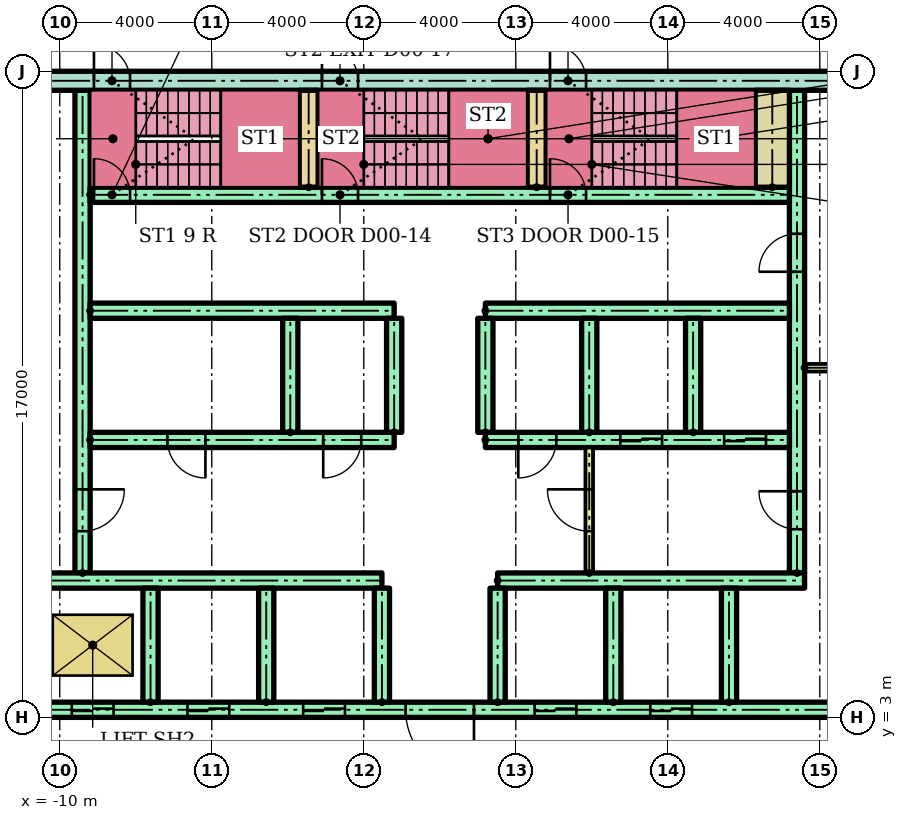
"""IFC4 building model, lengths in metres.
Left out: names, types, materials, properties, quantities, classifications, styles, units other than length and angle.
Written with IfcOpenShell. Run it as: python <this file> out.ifc"""

import sys

from ifc_helpers import new_model, si_unit, direction, frame, frame_2d, origin, place, context, subcontext, project, spatial, rectangle, extrude, element, fill, save


model = new_model("IFC4")
c1 = context("Model", 3, precision=1e-05, world=origin(), true_north=direction((0.0, 1.0)))
c2 = subcontext(c1, "Body", "Model", "MODEL_VIEW")
j1 = project(units=[si_unit("LENGTHUNIT", "METRE"), si_unit("PLANEANGLEUNIT", "RADIAN")], contexts=[c1])
p1 = place(None, origin())
s1 = spatial("IfcSite", under=j1, at=p1, CompositionType="ELEMENT")
p2 = place(p1, origin())
s2 = spatial("IfcBuilding", under=s1, at=p2, CompositionType="ELEMENT")
p3 = place(p2, origin())
s3 = spatial("IfcBuildingStorey", under=s2, at=p3, CompositionType="ELEMENT", Elevation=0.0)
p4 = place(p3, frame((-13.5, 19.75, 0.0)))
e1 = element("IfcWall", 1, at=p4, inside=s3, PredefinedType="SHEAR", context=c2, shape_type="SweptSolid", body=[
    extrude(rectangle(XDim=27.0, YDim=0.5, at=frame_2d((13.5, 0.0))), origin(), (0.0, 0.0, 1.0), 5.7),
])
p5 = place(p4, frame((4.4, 0.0, 0.0)))
e2 = element("IfcOpeningElement", 2, at=p5, cuts=e1, PredefinedType="OPENING", context=c2, shape_type="SweptSolid", body=[
    extrude(rectangle(XDim=0.95, YDim=2.1, at=frame_2d((0.475, 1.05))), frame((0.0, 0.26, 0.0), z_axis=(0.0, -1.0, 0.0), x_axis=(1.0, 0.0, 0.0)), (0.0, 0.0, 1.0), 0.52),
])
p6 = place(p4, frame((10.4, 0.0, 0.0)))
e3 = element("IfcOpeningElement", 3, at=p6, cuts=e1, PredefinedType="OPENING", context=c2, shape_type="SweptSolid", body=[
    extrude(rectangle(XDim=0.95, YDim=2.1, at=frame_2d((0.475, 1.05))), frame((0.0, 0.26, 0.0), z_axis=(0.0, -1.0, 0.0), x_axis=(1.0, 0.0, 0.0)), (0.0, 0.0, 1.0), 0.52),
])
p7 = place(p4, frame((16.4, 0.0, 0.0)))
e4 = element("IfcOpeningElement", 4, at=p7, cuts=e1, PredefinedType="OPENING", context=c2, shape_type="SweptSolid", body=[
    extrude(rectangle(XDim=0.95, YDim=2.1, at=frame_2d((0.475, 1.05))), frame((0.0, 0.26, 0.0), z_axis=(0.0, -1.0, 0.0), x_axis=(1.0, 0.0, 0.0)), (0.0, 0.0, 1.0), 0.52),
])
p8 = place(p3, frame((-9.4, 6.8, 0.0), z_axis=(0.0, 0.0, 1.0), x_axis=(0.0, 1.0, 0.0)))
e5 = element("IfcWall", 5, at=p8, inside=s3, PredefinedType="SHEAR", context=c2, shape_type="SweptSolid", body=[
    extrude(rectangle(XDim=12.7, YDim=0.4, at=frame_2d((6.35, 0.0))), origin(), (0.0, 0.0, 1.0), 5.7),
])
p9 = place(p8, frame((1.1, 0.0, 0.0)))
e6 = element("IfcOpeningElement", 6, at=p9, cuts=e5, PredefinedType="OPENING", context=c2, shape_type="SweptSolid", body=[
    extrude(rectangle(XDim=1.1, YDim=2.1, at=frame_2d((0.55, 1.05))), frame((0.0, 0.21, 0.0), z_axis=(0.0, -1.0, 0.0), x_axis=(1.0, 0.0, 0.0)), (0.0, 0.0, 1.0), 0.42),
])
p10 = place(p3, frame((9.4, 6.8, 0.0), z_axis=(0.0, 0.0, 1.0), x_axis=(0.0, 1.0, 0.0)))
e7 = element("IfcWall", 7, at=p10, inside=s3, PredefinedType="SHEAR", context=c2, shape_type="SweptSolid", body=[
    extrude(rectangle(XDim=12.7, YDim=0.4, at=frame_2d((6.35, 0.0))), origin(), (0.0, 0.0, 1.0), 5.7),
])
p11 = place(p10, frame((1.15, 0.0, 0.0)))
e8 = element("IfcOpeningElement", 8, at=p11, cuts=e7, PredefinedType="OPENING", context=c2, shape_type="SweptSolid", body=[
    extrude(rectangle(XDim=1.0, YDim=2.1, at=frame_2d((0.5, 1.05))), frame((0.0, 0.21, 0.0), z_axis=(0.0, -1.0, 0.0), x_axis=(1.0, 0.0, 0.0)), (0.0, 0.0, 1.0), 0.42),
])
p12 = place(p10, frame((7.925, 0.0, 0.0)))
e9 = element("IfcOpeningElement", 9, at=p12, cuts=e7, PredefinedType="OPENING", context=c2, shape_type="SweptSolid", body=[
    extrude(rectangle(XDim=1.0, YDim=2.1, at=frame_2d((0.5, 1.05))), frame((0.0, 0.21, 0.0), z_axis=(0.0, -1.0, 0.0), x_axis=(1.0, 0.0, 0.0)), (0.0, 0.0, 1.0), 0.42),
])
p13 = place(p3, frame((-13.5, 3.2, 0.0)))
e10 = element("IfcWall", 10, at=p13, inside=s3, PredefinedType="SHEAR", context=c2, shape_type="SweptSolid", body=[
    extrude(rectangle(XDim=27.0, YDim=0.4, at=frame_2d((13.5, 0.0))), origin(), (0.0, 0.0, 1.0), 5.7),
])
p14 = place(p13, frame((0.772, 0.0, 0.0)))
e11 = element("IfcOpeningElement", 11, at=p14, cuts=e10, PredefinedType="OPENING", context=c2, shape_type="SweptSolid", body=[
    extrude(rectangle(XDim=1.1, YDim=2.1, at=frame_2d((0.55, 1.05))), frame((0.0, 0.21, 0.0), z_axis=(0.0, -1.0, 0.0), x_axis=(1.0, 0.0, 0.0)), (0.0, 0.0, 1.0), 0.42),
])
p15 = place(p13, frame((3.817, 0.0, 0.0)))
e12 = element("IfcOpeningElement", 12, at=p15, cuts=e10, PredefinedType="OPENING", context=c2, shape_type="SweptSolid", body=[
    extrude(rectangle(XDim=1.1, YDim=2.1, at=frame_2d((0.55, 1.05))), frame((0.0, 0.21, 0.0), z_axis=(0.0, -1.0, 0.0), x_axis=(1.0, 0.0, 0.0)), (0.0, 0.0, 1.0), 0.42),
])
p16 = place(p13, frame((6.861, 0.0, 0.0)))
e13 = element("IfcOpeningElement", 13, at=p16, cuts=e10, PredefinedType="OPENING", context=c2, shape_type="SweptSolid", body=[
    extrude(rectangle(XDim=1.1, YDim=2.1, at=frame_2d((0.55, 1.05))), frame((0.0, 0.21, 0.0), z_axis=(0.0, -1.0, 0.0), x_axis=(1.0, 0.0, 0.0)), (0.0, 0.0, 1.0), 0.42),
])
p17 = place(p13, frame((9.906, 0.0, 0.0)))
e14 = element("IfcOpeningElement", 14, at=p17, cuts=e10, PredefinedType="OPENING", context=c2, shape_type="SweptSolid", body=[
    extrude(rectangle(XDim=1.1, YDim=2.1, at=frame_2d((0.55, 1.05))), frame((0.0, 0.21, 0.0), z_axis=(0.0, -1.0, 0.0), x_axis=(1.0, 0.0, 0.0)), (0.0, 0.0, 1.0), 0.42),
])
p18 = place(p13, frame((15.994, 0.0, 0.0)))
e15 = element("IfcOpeningElement", 15, at=p18, cuts=e10, PredefinedType="OPENING", context=c2, shape_type="SweptSolid", body=[
    extrude(rectangle(XDim=1.1, YDim=2.1, at=frame_2d((0.55, 1.05))), frame((0.0, 0.21, 0.0), z_axis=(0.0, -1.0, 0.0), x_axis=(1.0, 0.0, 0.0)), (0.0, 0.0, 1.0), 0.42),
])
p19 = place(p13, frame((19.039, 0.0, 0.0)))
e16 = element("IfcOpeningElement", 16, at=p19, cuts=e10, PredefinedType="OPENING", context=c2, shape_type="SweptSolid", body=[
    extrude(rectangle(XDim=1.1, YDim=2.1, at=frame_2d((0.55, 1.05))), frame((0.0, 0.21, 0.0), z_axis=(0.0, -1.0, 0.0), x_axis=(1.0, 0.0, 0.0)), (0.0, 0.0, 1.0), 0.42),
])
p20 = place(p13, frame((12.6, 0.0, 0.0)))
e17 = element("IfcOpeningElement", 17, at=p20, cuts=e10, PredefinedType="OPENING", context=c2, shape_type="SweptSolid", body=[
    extrude(rectangle(XDim=1.8, YDim=2.1, at=frame_2d((0.9, 1.05))), frame((0.0, 0.21, 0.0), z_axis=(0.0, -1.0, 0.0), x_axis=(1.0, 0.0, 0.0)), (0.0, 0.0, 1.0), 0.42),
])
p21 = place(p3, frame((-13.5, 6.6, 0.0)))
e18 = element("IfcWall", 18, at=p21, inside=s3, PredefinedType="SHEAR", context=c2, shape_type="SweptSolid", body=[
    extrude(rectangle(XDim=11.978, YDim=0.4, at=frame_2d((5.989, 0.0))), origin(), (0.0, 0.0, 1.0), 5.7),
])
p22 = place(p3, frame((1.522, 6.6, 0.0)))
e19 = element("IfcWall", 19, at=p22, inside=s3, PredefinedType="SHEAR", context=c2, shape_type="SweptSolid", body=[
    extrude(rectangle(XDim=8.078, YDim=0.4, at=frame_2d((4.039, 0.0))), origin(), (0.0, 0.0, 1.0), 5.7),
])
for number, where, z_axis, x_axis in (
    (20, (-7.611, 3.4, 0.0), (0.0, 0.0, 1.0), (0.0, 1.0, 0.0)),
    (21, (-4.567, 3.4, 0.0), (0.0, 0.0, 1.0), (0.0, 1.0, 0.0)),
    (22, (-1.522, 3.4, 0.0), (0.0, 0.0, 1.0), (0.0, 1.0, 0.0)),
    (23, (1.522, 3.4, 0.0), (0.0, 0.0, 1.0), (0.0, 1.0, 0.0)),
    (24, (4.567, 3.4, 0.0), (0.0, 0.0, 1.0), (0.0, 1.0, 0.0)),
    (25, (7.611, 3.4, 0.0), (0.0, 0.0, 1.0), (0.0, 1.0, 0.0)),
):
    element("IfcWall", number, at=place(p3, frame(where, z_axis=z_axis, x_axis=x_axis)), inside=s3, PredefinedType="SHEAR", context=c2, shape_type="SweptSolid", body=[
        extrude(rectangle(XDim=3.0, YDim=0.4, at=frame_2d((1.5, 0.0))), origin(), (0.0, 0.0, 1.0), 5.7),
    ])
p23 = place(p3, frame((-9.2, 10.3, 0.0)))
e26 = element("IfcWall", 26, at=p23, inside=s3, PredefinedType="SHEAR", context=c2, shape_type="SweptSolid", body=[
    extrude(rectangle(XDim=8.0, YDim=0.4, at=frame_2d((4.0, 0.0))), origin(), (0.0, 0.0, 1.0), 5.7),
])
p24 = place(p23, frame((2.033, 0.0, 0.0)))
e27 = element("IfcOpeningElement", 27, at=p24, cuts=e26, PredefinedType="OPENING", context=c2, shape_type="SweptSolid", body=[
    extrude(rectangle(XDim=1.0, YDim=2.1, at=frame_2d((0.5, 1.05))), frame((0.0, 0.21, 0.0), z_axis=(0.0, -1.0, 0.0), x_axis=(1.0, 0.0, 0.0)), (0.0, 0.0, 1.0), 0.42),
])
p25 = place(p23, frame((6.133, 0.0, 0.0)))
e28 = element("IfcOpeningElement", 28, at=p25, cuts=e26, PredefinedType="OPENING", context=c2, shape_type="SweptSolid", body=[
    extrude(rectangle(XDim=1.0, YDim=2.1, at=frame_2d((0.5, 1.05))), frame((0.0, 0.21, 0.0), z_axis=(0.0, -1.0, 0.0), x_axis=(1.0, 0.0, 0.0)), (0.0, 0.0, 1.0), 0.42),
])
p26 = place(p3, frame((-9.2, 13.7, 0.0)))
e29 = element("IfcWall", 29, at=p26, inside=s3, PredefinedType="SHEAR", context=c2, shape_type="SweptSolid", body=[
    extrude(rectangle(XDim=8.0, YDim=0.4, at=frame_2d((4.0, 0.0))), origin(), (0.0, 0.0, 1.0), 5.7),
])
p27 = place(p3, frame((1.2, 10.3, 0.0)))
e30 = element("IfcWall", 30, at=p27, inside=s3, PredefinedType="SHEAR", context=c2, shape_type="SweptSolid", body=[
    extrude(rectangle(XDim=8.0, YDim=0.4, at=frame_2d((4.0, 0.0))), origin(), (0.0, 0.0, 1.0), 5.7),
])
p28 = place(p27, frame((3.55, 0.0, 0.0)))
e31 = element("IfcOpeningElement", 31, at=p28, cuts=e30, PredefinedType="OPENING", context=c2, shape_type="SweptSolid", body=[
    extrude(rectangle(XDim=1.1, YDim=2.1, at=frame_2d((0.55, 1.05))), frame((0.0, 0.21, 0.0), z_axis=(0.0, -1.0, 0.0), x_axis=(1.0, 0.0, 0.0)), (0.0, 0.0, 1.0), 0.42),
])
p29 = place(p27, frame((6.283, 0.0, 0.0)))
e32 = element("IfcOpeningElement", 32, at=p29, cuts=e30, PredefinedType="OPENING", context=c2, shape_type="SweptSolid", body=[
    extrude(rectangle(XDim=1.1, YDim=2.1, at=frame_2d((0.55, 1.05))), frame((0.0, 0.21, 0.0), z_axis=(0.0, -1.0, 0.0), x_axis=(1.0, 0.0, 0.0)), (0.0, 0.0, 1.0), 0.42),
])
p30 = place(p27, frame((0.867, 0.0, 0.0)))
e33 = element("IfcOpeningElement", 33, at=p30, cuts=e30, PredefinedType="OPENING", context=c2, shape_type="SweptSolid", body=[
    extrude(rectangle(XDim=1.0, YDim=2.1, at=frame_2d((0.5, 1.05))), frame((0.0, 0.21, 0.0), z_axis=(0.0, -1.0, 0.0), x_axis=(1.0, 0.0, 0.0)), (0.0, 0.0, 1.0), 0.42),
])
p31 = place(p3, frame((1.2, 13.7, 0.0)))
e34 = element("IfcWall", 34, at=p31, inside=s3, PredefinedType="SHEAR", context=c2, shape_type="SweptSolid", body=[
    extrude(rectangle(XDim=8.0, YDim=0.4, at=frame_2d((4.0, 0.0))), origin(), (0.0, 0.0, 1.0), 5.7),
])
for number, where, z_axis, x_axis in (
    (35, (-3.933, 10.5, 0.0), (0.0, 0.0, 1.0), (0.0, 1.0, 0.0)),
    (36, (-1.2, 10.5, 0.0), (0.0, 0.0, 1.0), (0.0, 1.0, 0.0)),
    (37, (1.2, 10.5, 0.0), (0.0, 0.0, 1.0), (0.0, 1.0, 0.0)),
    (38, (3.933, 10.5, 0.0), (0.0, 0.0, 1.0), (0.0, 1.0, 0.0)),
    (39, (6.667, 10.5, 0.0), (0.0, 0.0, 1.0), (0.0, 1.0, 0.0)),
):
    element("IfcWall", number, at=place(p3, frame(where, z_axis=z_axis, x_axis=x_axis)), inside=s3, PredefinedType="SHEAR", context=c2, shape_type="SweptSolid", body=[
        extrude(rectangle(XDim=3.0, YDim=0.4, at=frame_2d((1.5, 0.0))), origin(), (0.0, 0.0, 1.0), 5.7),
    ])
p32 = place(p3, frame((3.933, 6.8, 0.0), z_axis=(0.0, 0.0, 1.0), x_axis=(0.0, 1.0, 0.0)))
e40 = element("IfcWall", 40, at=p32, inside=s3, PredefinedType="PARTITIONING", context=c2, shape_type="SweptSolid", body=[
    extrude(rectangle(XDim=3.3, YDim=0.2, at=frame_2d((1.65, 0.0))), origin(), (0.0, 0.0, 1.0), 5.7),
])
p33 = place(p32, frame((1.1, 0.0, 0.0)))
e41 = element("IfcOpeningElement", 41, at=p33, cuts=e40, PredefinedType="OPENING", context=c2, shape_type="SweptSolid", body=[
    extrude(rectangle(XDim=1.1, YDim=2.1, at=frame_2d((0.55, 1.05))), frame((0.0, 0.11, 0.0), z_axis=(0.0, -1.0, 0.0), x_axis=(1.0, 0.0, 0.0)), (0.0, 0.0, 1.0), 0.22),
])
p34 = place(p3, frame((-9.2, 16.75, 0.0)))
e42 = element("IfcWall", 42, at=p34, inside=s3, PredefinedType="SHEAR", context=c2, shape_type="SweptSolid", body=[
    extrude(rectangle(XDim=18.4, YDim=0.4, at=frame_2d((9.2, 0.0))), origin(), (0.0, 0.0, 1.0), 5.7),
])
p35 = place(p34, frame((0.1, 0.0, 0.0)))
e43 = element("IfcOpeningElement", 43, at=p35, cuts=e42, PredefinedType="OPENING", context=c2, shape_type="SweptSolid", body=[
    extrude(rectangle(XDim=0.95, YDim=2.1, at=frame_2d((0.475, 1.05))), frame((0.0, 0.21, 0.0), z_axis=(0.0, -1.0, 0.0), x_axis=(1.0, 0.0, 0.0)), (0.0, 0.0, 1.0), 0.42),
])
p36 = place(p34, frame((6.1, 0.0, 0.0)))
e44 = element("IfcOpeningElement", 44, at=p36, cuts=e42, PredefinedType="OPENING", context=c2, shape_type="SweptSolid", body=[
    extrude(rectangle(XDim=0.95, YDim=2.1, at=frame_2d((0.475, 1.05))), frame((0.0, 0.21, 0.0), z_axis=(0.0, -1.0, 0.0), x_axis=(1.0, 0.0, 0.0)), (0.0, 0.0, 1.0), 0.42),
])
p37 = place(p34, frame((12.1, 0.0, 0.0)))
e45 = element("IfcOpeningElement", 45, at=p37, cuts=e42, PredefinedType="OPENING", context=c2, shape_type="SweptSolid", body=[
    extrude(rectangle(XDim=0.95, YDim=2.1, at=frame_2d((0.475, 1.05))), frame((0.0, 0.21, 0.0), z_axis=(0.0, -1.0, 0.0), x_axis=(1.0, 0.0, 0.0)), (0.0, 0.0, 1.0), 0.42),
])
for number, where, z_axis, x_axis in (
    (46, (-3.45, 16.95, 0.0), (0.0, 0.0, 1.0), (0.0, 1.0, 0.0)),
    (47, (2.55, 16.95, 0.0), (0.0, 0.0, 1.0), (0.0, 1.0, 0.0)),
):
    element("IfcWall", number, at=place(p3, frame(where, z_axis=z_axis, x_axis=x_axis)), inside=s3, PredefinedType="SHEAR", context=c2, shape_type="SweptSolid", body=[
        extrude(rectangle(XDim=2.55, YDim=0.5, at=frame_2d((1.275, 0.0))), origin(), (0.0, 0.0, 1.0), 5.7),
    ])
p38 = place(p3, frame((8.75, 16.95, 0.0), z_axis=(0.0, 0.0, 1.0), x_axis=(0.0, 1.0, 0.0)))
e48 = element("IfcWall", 48, at=p38, inside=s3, PredefinedType="SHEAR", context=c2, shape_type="SweptSolid", body=[
    extrude(rectangle(XDim=2.55, YDim=0.9, at=frame_2d((1.275, 0.0))), origin(), (0.0, 0.0, 1.0), 5.7),
])
p39 = place(p3, frame((9.6, 12.2, 0.0)))
e49 = element("IfcWall", 49, at=p39, inside=s3, PredefinedType="PARTITIONING", context=c2, shape_type="SweptSolid", body=[
    extrude(rectangle(XDim=3.9, YDim=0.2, at=frame_2d((1.95, 0.0))), origin(), (0.0, 0.0, 1.0), 5.7),
])
p40 = place(p15, origin())
e50 = element("IfcDoor", 50, at=p40, inside=s3, OperationType="SLIDING_TO_LEFT", PredefinedType="DOOR", context=c2, shape_type="SweptSolid", body=[
    extrude(rectangle(XDim=1.1, YDim=2.1, at=frame_2d((0.55, 1.05))), frame((0.0, 0.025, 0.0), z_axis=(0.0, -1.0, 0.0), x_axis=(1.0, 0.0, 0.0)), (0.0, 0.0, 1.0), 0.05),
])
fill(e12, e50)
p41 = place(p16, origin())
e51 = element("IfcDoor", 51, at=p41, inside=s3, OperationType="SLIDING_TO_LEFT", PredefinedType="DOOR", context=c2, shape_type="SweptSolid", body=[
    extrude(rectangle(XDim=1.1, YDim=2.1, at=frame_2d((0.55, 1.05))), frame((0.0, 0.025, 0.0), z_axis=(0.0, -1.0, 0.0), x_axis=(1.0, 0.0, 0.0)), (0.0, 0.0, 1.0), 0.05),
])
fill(e13, e51)
p42 = place(p17, origin())
e52 = element("IfcDoor", 52, at=p42, inside=s3, OperationType="SLIDING_TO_LEFT", PredefinedType="DOOR", context=c2, shape_type="SweptSolid", body=[
    extrude(rectangle(XDim=1.1, YDim=2.1, at=frame_2d((0.55, 1.05))), frame((0.0, 0.025, 0.0), z_axis=(0.0, -1.0, 0.0), x_axis=(1.0, 0.0, 0.0)), (0.0, 0.0, 1.0), 0.05),
])
fill(e14, e52)
p43 = place(p18, origin())
e53 = element("IfcDoor", 53, at=p43, inside=s3, OperationType="SLIDING_TO_LEFT", PredefinedType="DOOR", context=c2, shape_type="SweptSolid", body=[
    extrude(rectangle(XDim=1.1, YDim=2.1, at=frame_2d((0.55, 1.05))), frame((0.0, 0.025, 0.0), z_axis=(0.0, -1.0, 0.0), x_axis=(1.0, 0.0, 0.0)), (0.0, 0.0, 1.0), 0.05),
])
fill(e15, e53)
p44 = place(p19, origin())
e54 = element("IfcDoor", 54, at=p44, inside=s3, OperationType="SLIDING_TO_LEFT", PredefinedType="DOOR", context=c2, shape_type="SweptSolid", body=[
    extrude(rectangle(XDim=1.1, YDim=2.1, at=frame_2d((0.55, 1.05))), frame((0.0, 0.025, 0.0), z_axis=(0.0, -1.0, 0.0), x_axis=(1.0, 0.0, 0.0)), (0.0, 0.0, 1.0), 0.05),
])
fill(e16, e54)
p45 = place(p20, frame((1.8, 0.0, 0.0), z_axis=(0.0, 0.0, 1.0), x_axis=(-1.0, 0.0, 0.0)))
e55 = element("IfcDoor", 55, at=p45, inside=s3, OperationType="DOUBLE_DOOR_SINGLE_SWING", PredefinedType="DOOR", context=c2, shape_type="SweptSolid", body=[
    extrude(rectangle(XDim=1.8, YDim=2.1, at=frame_2d((0.9, 1.05))), frame((0.0, 0.025, 0.0), z_axis=(0.0, -1.0, 0.0), x_axis=(1.0, 0.0, 0.0)), (0.0, 0.0, 1.0), 0.05),
])
fill(e17, e55)
p46 = place(p28, origin())
e56 = element("IfcDoor", 56, at=p46, inside=s3, OperationType="SLIDING_TO_LEFT", PredefinedType="DOOR", context=c2, shape_type="SweptSolid", body=[
    extrude(rectangle(XDim=1.1, YDim=2.1, at=frame_2d((0.55, 1.05))), frame((0.0, 0.025, 0.0), z_axis=(0.0, -1.0, 0.0), x_axis=(1.0, 0.0, 0.0)), (0.0, 0.0, 1.0), 0.05),
])
fill(e31, e56)
p47 = place(p29, origin())
e57 = element("IfcDoor", 57, at=p47, inside=s3, OperationType="SLIDING_TO_LEFT", PredefinedType="DOOR", context=c2, shape_type="SweptSolid", body=[
    extrude(rectangle(XDim=1.1, YDim=2.1, at=frame_2d((0.55, 1.05))), frame((0.0, 0.025, 0.0), z_axis=(0.0, -1.0, 0.0), x_axis=(1.0, 0.0, 0.0)), (0.0, 0.0, 1.0), 0.05),
])
fill(e32, e57)
p48 = place(p24, frame((1.0, 0.0, 0.0), z_axis=(0.0, 0.0, 1.0), x_axis=(-1.0, 0.0, 0.0)))
e58 = element("IfcDoor", 58, at=p48, inside=s3, OperationType="SINGLE_SWING_RIGHT", PredefinedType="DOOR", context=c2, shape_type="SweptSolid", body=[
    extrude(rectangle(XDim=1.0, YDim=2.1, at=frame_2d((0.5, 1.05))), frame((0.0, 0.025, 0.0), z_axis=(0.0, -1.0, 0.0), x_axis=(1.0, 0.0, 0.0)), (0.0, 0.0, 1.0), 0.05),
])
fill(e27, e58)
p49 = place(p25, frame((1.0, 0.0, 0.0), z_axis=(0.0, 0.0, 1.0), x_axis=(-1.0, 0.0, 0.0)))
e59 = element("IfcDoor", 59, at=p49, inside=s3, OperationType="SINGLE_SWING_LEFT", PredefinedType="DOOR", context=c2, shape_type="SweptSolid", body=[
    extrude(rectangle(XDim=1.0, YDim=2.1, at=frame_2d((0.5, 1.05))), frame((0.0, 0.025, 0.0), z_axis=(0.0, -1.0, 0.0), x_axis=(1.0, 0.0, 0.0)), (0.0, 0.0, 1.0), 0.05),
])
fill(e28, e59)
p50 = place(p30, frame((1.0, 0.0, 0.0), z_axis=(0.0, 0.0, 1.0), x_axis=(-1.0, 0.0, 0.0)))
e60 = element("IfcDoor", 60, at=p50, inside=s3, OperationType="SINGLE_SWING_LEFT", PredefinedType="DOOR", context=c2, shape_type="SweptSolid", body=[
    extrude(rectangle(XDim=1.0, YDim=2.1, at=frame_2d((0.5, 1.05))), frame((0.0, 0.025, 0.0), z_axis=(0.0, -1.0, 0.0), x_axis=(1.0, 0.0, 0.0)), (0.0, 0.0, 1.0), 0.05),
])
fill(e33, e60)
p51 = place(p33, origin())
e61 = element("IfcDoor", 61, at=p51, inside=s3, OperationType="SINGLE_SWING_RIGHT", PredefinedType="DOOR", context=c2, shape_type="SweptSolid", body=[
    extrude(rectangle(XDim=1.1, YDim=2.1, at=frame_2d((0.55, 1.05))), frame((0.0, 0.025, 0.0), z_axis=(0.0, -1.0, 0.0), x_axis=(1.0, 0.0, 0.0)), (0.0, 0.0, 1.0), 0.05),
])
fill(e41, e61)
p52 = place(p35, origin())
e62 = element("IfcDoor", 62, at=p52, inside=s3, OperationType="SINGLE_SWING_LEFT", PredefinedType="DOOR", context=c2, shape_type="SweptSolid", body=[
    extrude(rectangle(XDim=0.95, YDim=2.1, at=frame_2d((0.475, 1.05))), frame((0.0, 0.025, 0.0), z_axis=(0.0, -1.0, 0.0), x_axis=(1.0, 0.0, 0.0)), (0.0, 0.0, 1.0), 0.05),
])
fill(e43, e62)
p53 = place(p36, origin())
e63 = element("IfcDoor", 63, at=p53, inside=s3, OperationType="SINGLE_SWING_LEFT", PredefinedType="DOOR", context=c2, shape_type="SweptSolid", body=[
    extrude(rectangle(XDim=0.95, YDim=2.1, at=frame_2d((0.475, 1.05))), frame((0.0, 0.025, 0.0), z_axis=(0.0, -1.0, 0.0), x_axis=(1.0, 0.0, 0.0)), (0.0, 0.0, 1.0), 0.05),
])
fill(e44, e63)
p54 = place(p37, origin())
e64 = element("IfcDoor", 64, at=p54, inside=s3, OperationType="SINGLE_SWING_LEFT", PredefinedType="DOOR", context=c2, shape_type="SweptSolid", body=[
    extrude(rectangle(XDim=0.95, YDim=2.1, at=frame_2d((0.475, 1.05))), frame((0.0, 0.025, 0.0), z_axis=(0.0, -1.0, 0.0), x_axis=(1.0, 0.0, 0.0)), (0.0, 0.0, 1.0), 0.05),
])
fill(e45, e64)
p55 = place(p5, origin())
e65 = element("IfcDoor", 65, at=p55, inside=s3, OperationType="SINGLE_SWING_LEFT", PredefinedType="DOOR", context=c2, shape_type="SweptSolid", body=[
    extrude(rectangle(XDim=0.95, YDim=2.1, at=frame_2d((0.475, 1.05))), frame((0.0, 0.025, 0.0), z_axis=(0.0, -1.0, 0.0), x_axis=(1.0, 0.0, 0.0)), (0.0, 0.0, 1.0), 0.05),
])
fill(e2, e65)
p56 = place(p6, origin())
e66 = element("IfcDoor", 66, at=p56, inside=s3, OperationType="SINGLE_SWING_LEFT", PredefinedType="DOOR", context=c2, shape_type="SweptSolid", body=[
    extrude(rectangle(XDim=0.95, YDim=2.1, at=frame_2d((0.475, 1.05))), frame((0.0, 0.025, 0.0), z_axis=(0.0, -1.0, 0.0), x_axis=(1.0, 0.0, 0.0)), (0.0, 0.0, 1.0), 0.05),
])
fill(e3, e66)
p57 = place(p7, origin())
e67 = element("IfcDoor", 67, at=p57, inside=s3, OperationType="SINGLE_SWING_LEFT", PredefinedType="DOOR", context=c2, shape_type="SweptSolid", body=[
    extrude(rectangle(XDim=0.95, YDim=2.1, at=frame_2d((0.475, 1.05))), frame((0.0, 0.025, 0.0), z_axis=(0.0, -1.0, 0.0), x_axis=(1.0, 0.0, 0.0)), (0.0, 0.0, 1.0), 0.05),
])
fill(e4, e67)
p58 = place(p9, frame((1.1, 0.0, 0.0), z_axis=(0.0, 0.0, 1.0), x_axis=(-1.0, 0.0, 0.0)))
e68 = element("IfcDoor", 68, at=p58, inside=s3, OperationType="SINGLE_SWING_RIGHT", PredefinedType="DOOR", context=c2, shape_type="SweptSolid", body=[
    extrude(rectangle(XDim=1.1, YDim=2.1, at=frame_2d((0.55, 1.05))), frame((0.0, 0.025, 0.0), z_axis=(0.0, -1.0, 0.0), x_axis=(1.0, 0.0, 0.0)), (0.0, 0.0, 1.0), 0.05),
])
fill(e6, e68)
p59 = place(p11, origin())
e69 = element("IfcDoor", 69, at=p59, inside=s3, OperationType="SINGLE_SWING_RIGHT", PredefinedType="DOOR", context=c2, shape_type="SweptSolid", body=[
    extrude(rectangle(XDim=1.0, YDim=2.1, at=frame_2d((0.5, 1.05))), frame((0.0, 0.025, 0.0), z_axis=(0.0, -1.0, 0.0), x_axis=(1.0, 0.0, 0.0)), (0.0, 0.0, 1.0), 0.05),
])
fill(e8, e69)
p60 = place(p12, origin())
e70 = element("IfcDoor", 70, at=p60, inside=s3, OperationType="SINGLE_SWING_LEFT", PredefinedType="DOOR", context=c2, shape_type="SweptSolid", body=[
    extrude(rectangle(XDim=1.0, YDim=2.1, at=frame_2d((0.5, 1.05))), frame((0.0, 0.025, 0.0), z_axis=(0.0, -1.0, 0.0), x_axis=(1.0, 0.0, 0.0)), (0.0, 0.0, 1.0), 0.05),
])
fill(e9, e70)
save(model, sys.argv[1])
